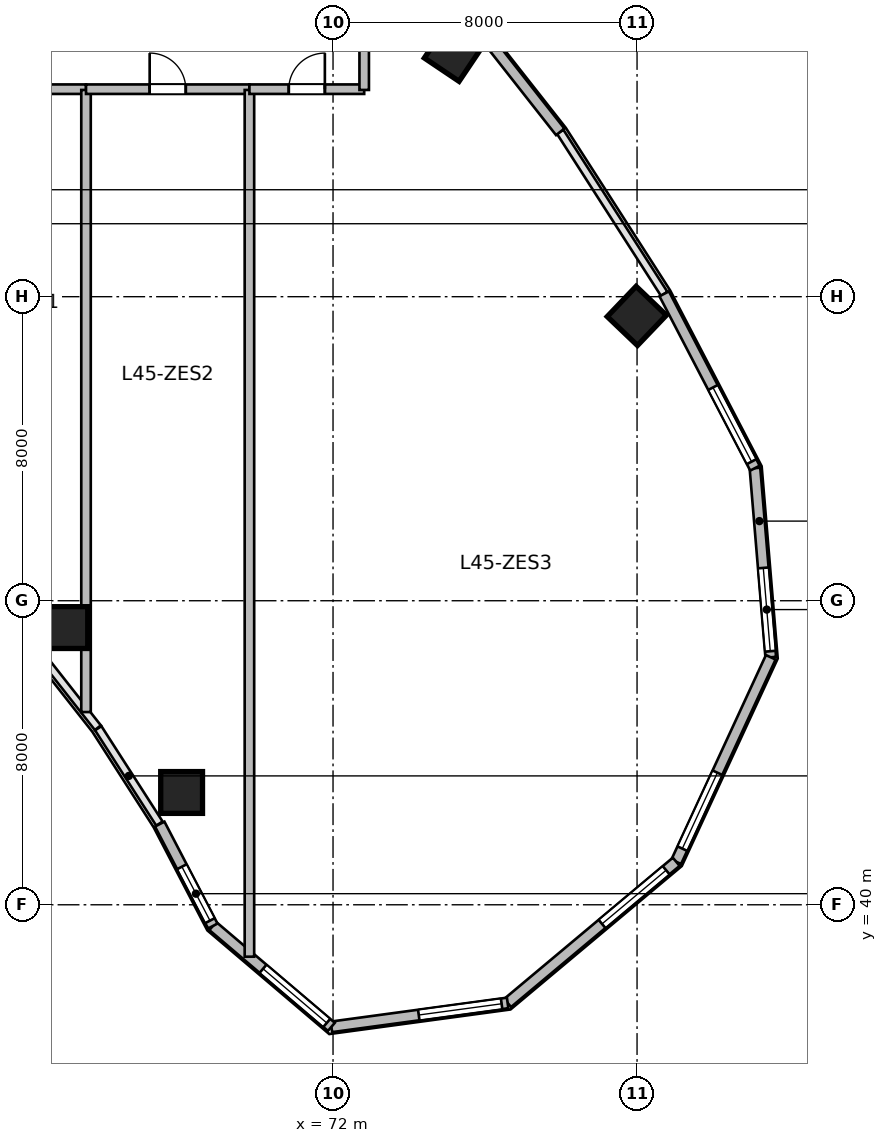
"""IFC4 building model, lengths in metres.
Left out: names, types, materials, properties, quantities, classifications, styles, units other than length and angle.
Written with IfcOpenShell. Run it as: python <this file> out.ifc"""

import sys

from ifc_helpers import new_model, si_unit, direction, frame, frame_2d, origin, origin_2d, place, context, subcontext, project, spatial, rectangle, circle, extrude, source, transform, mapped, element, fill, save


model = new_model("IFC4")
c1 = context("Model", 3, precision=1e-05, world=origin(), true_north=direction((0.0, 1.0)))
c2 = subcontext(c1, "Body", "Model", "MODEL_VIEW")
j1 = project(units=[si_unit("LENGTHUNIT", "METRE"), si_unit("PLANEANGLEUNIT", "RADIAN")], contexts=[c1])
p1 = place(None, origin())
s1 = spatial("IfcSite", under=j1, at=p1, CompositionType="ELEMENT")
p2 = place(p1, origin())
s2 = spatial("IfcBuilding", under=s1, at=p2, CompositionType="ELEMENT")
p3 = place(p2, frame((0.0, 0.0, 185.7)))
s3 = spatial("IfcBuildingStorey", under=s2, at=p3, CompositionType="ELEMENT", Elevation=185.7)
m1 = source(origin(), c2, "Body", "SweptSolid", [
    extrude(circle(Radius=0.55, at=origin_2d()), origin(), (0.0, 0.0, 1.0), 3.9),
])
p4 = place(p3, frame((64.996, 47.294, 0.0), z_axis=(0.0, 0.0, 1.0), x_axis=(0.55774510898, 0.830012285095, 0.0)))
e1 = element("IfcColumn", 1, at=p4, inside=s3, PredefinedType="COLUMN", context=c2, shape_type="MappedRepresentation", body=[
    mapped(m1, transform((0.0, 0.0, 0.0), scale=1.0)),
])
m2 = source(origin(), c2, "Body", "SweptSolid", [
    extrude(rectangle(XDim=1.1, YDim=1.1, at=origin_2d()), origin(), (0.0, 0.0, 1.0), 3.9),
])
p5 = place(p3, frame((75.167, 62.43, 0.0), z_axis=(0.0, 0.0, 1.0), x_axis=(0.55774510898, 0.830012285095, 0.0)))
e2 = element("IfcColumn", 2, at=p5, inside=s3, PredefinedType="COLUMN", context=c2, shape_type="MappedRepresentation", body=[
    mapped(m2, transform((0.0, 0.0, 0.0), scale=1.0)),
])
p6 = place(p3, frame((68.015, 42.955, 0.0), z_axis=(0.0, 0.0, 1.0), x_axis=(0.690756218984, 0.723087716626, 0.0)))
e3 = element("IfcColumn", 3, at=p6, inside=s3, PredefinedType="COLUMN", context=c2, shape_type="MappedRepresentation", body=[
    mapped(m1, transform((0.0, 0.0, 0.0), scale=1.0)),
])
p7 = place(p3, frame((79.993, 55.494, 0.0), z_axis=(0.0, 0.0, 1.0), x_axis=(0.690756218984, 0.723087716626, 0.0)))
e4 = element("IfcColumn", 4, at=p7, inside=s3, PredefinedType="COLUMN", context=c2, shape_type="MappedRepresentation", body=[
    mapped(m2, transform((0.0, 0.0, 0.0), scale=1.0)),
])
m3 = source(origin(), c2, "Body", "SweptSolid", [
    extrude(rectangle(XDim=4.994, YDim=0.28, at=frame_2d((2.497, 0.0))), origin(), (0.0, 0.0, 1.0), 3.58),
])
p8 = place(p3, frame((83.102, 51.489, 0.0), z_axis=(0.0, 0.0, 1.0), x_axis=(0.083344839916, -0.996520766296, 0.0)))
e5 = element("IfcWall", 5, at=p8, inside=s3, PredefinedType="SOLIDWALL", context=c2, shape_type="MappedRepresentation", body=[
    mapped(m3, transform((0.0, 0.0, 0.0), scale=1.0)),
])
p9 = place(p8, frame((2.635, 0.0, 0.95)))
e6 = element("IfcOpeningElement", 6, at=p9, cuts=e5, PredefinedType="OPENING", context=c2, shape_type="SweptSolid", body=[
    extrude(rectangle(XDim=2.2, YDim=2.1, at=frame_2d((1.1, 1.05))), frame((0.0, 0.15, 0.0), z_axis=(0.0, -1.0, 0.0), x_axis=(1.0, 0.0, 0.0)), (0.0, 0.0, 1.0), 0.3),
])
m4 = source(origin(), c2, "Body", "SweptSolid", [
    extrude(rectangle(XDim=5.927, YDim=0.28, at=frame_2d((2.964, 0.0))), origin(), (0.0, 0.0, 1.0), 3.58),
])
p10 = place(p3, frame((83.519, 46.512, 0.0), z_axis=(0.0, 0.0, 1.0), x_axis=(-0.419656204795, -0.907683132914, 0.0)))
e7 = element("IfcWall", 7, at=p10, inside=s3, PredefinedType="SOLIDWALL", context=c2, shape_type="MappedRepresentation", body=[
    mapped(m4, transform((0.0, 0.0, 0.0), scale=1.0)),
])
p11 = place(p10, frame((3.346, 0.0, 0.95)))
e8 = element("IfcOpeningElement", 8, at=p11, cuts=e7, PredefinedType="OPENING", context=c2, shape_type="SweptSolid", body=[
    extrude(rectangle(XDim=2.2, YDim=2.1, at=frame_2d((1.1, 1.05))), frame((0.0, 0.15, 0.0), z_axis=(0.0, -1.0, 0.0), x_axis=(1.0, 0.0, 0.0)), (0.0, 0.0, 1.0), 0.3),
])
m5 = source(origin(), c2, "Body", "SweptSolid", [
    extrude(rectangle(XDim=5.786, YDim=0.28, at=frame_2d((2.893, 0.0))), origin(), (0.0, 0.0, 1.0), 3.58),
])
p12 = place(p3, frame((81.031, 41.131, 0.0), z_axis=(0.0, 0.0, 1.0), x_axis=(-0.766711306852, -0.641992034176, 0.0)))
e9 = element("IfcWall", 9, at=p12, inside=s3, PredefinedType="SOLIDWALL", context=c2, shape_type="MappedRepresentation", body=[
    mapped(m5, transform((0.0, 0.0, 0.0), scale=1.0)),
])
p13 = place(p12, frame((0.347, 0.0, 0.95)))
e10 = element("IfcOpeningElement", 10, at=p13, cuts=e9, PredefinedType="OPENING", context=c2, shape_type="SweptSolid", body=[
    extrude(rectangle(XDim=2.2, YDim=2.1, at=frame_2d((1.1, 1.05))), frame((0.0, 0.15, 0.0), z_axis=(0.0, -1.0, 0.0), x_axis=(1.0, 0.0, 0.0)), (0.0, 0.0, 1.0), 0.3),
])
m6 = source(origin(), c2, "Body", "SweptSolid", [
    extrude(rectangle(XDim=4.68, YDim=0.28, at=frame_2d((2.34, 0.0))), origin(), (0.0, 0.0, 1.0), 3.58),
])
p14 = place(p3, frame((76.594, 37.417, 0.0), z_axis=(0.0, 0.0, 1.0), x_axis=(-0.990931146435, -0.134370618162, 0.0)))
e11 = element("IfcWall", 11, at=p14, inside=s3, PredefinedType="SOLIDWALL", context=c2, shape_type="MappedRepresentation", body=[
    mapped(m6, transform((0.0, 0.0, 0.0), scale=1.0)),
])
p15 = place(p14, frame((0.16, 0.0, 0.95)))
e12 = element("IfcOpeningElement", 12, at=p15, cuts=e11, PredefinedType="OPENING", context=c2, shape_type="SweptSolid", body=[
    extrude(rectangle(XDim=2.2, YDim=2.1, at=frame_2d((1.1, 1.05))), frame((0.0, 0.15, 0.0), z_axis=(0.0, -1.0, 0.0), x_axis=(1.0, 0.0, 0.0)), (0.0, 0.0, 1.0), 0.3),
])
m7 = source(origin(), c2, "Body", "SweptSolid", [
    extrude(rectangle(XDim=4.096, YDim=0.28, at=frame_2d((2.048, 0.0))), origin(), (0.0, 0.0, 1.0), 3.58),
])
p16 = place(p3, frame((71.957, 36.788, 0.0), z_axis=(0.0, 0.0, 1.0), x_axis=(-0.761926081737, 0.647663991564, 0.0)))
e13 = element("IfcWall", 13, at=p16, inside=s3, PredefinedType="SOLIDWALL", context=c2, shape_type="MappedRepresentation", body=[
    mapped(m7, transform((0.0, 0.0, 0.0), scale=1.0)),
])
p17 = place(p16, frame((0.16, 0.0, 0.95)))
e14 = element("IfcOpeningElement", 14, at=p17, cuts=e13, PredefinedType="OPENING", context=c2, shape_type="SweptSolid", body=[
    extrude(rectangle(XDim=2.2, YDim=2.1, at=frame_2d((1.1, 1.05))), frame((0.0, 0.15, 0.0), z_axis=(0.0, -1.0, 0.0), x_axis=(1.0, 0.0, 0.0)), (0.0, 0.0, 1.0), 0.3),
])
m8 = source(origin(), c2, "Body", "SweptSolid", [
    extrude(rectangle(XDim=3.024, YDim=0.28, at=frame_2d((1.512, 0.0))), origin(), (0.0, 0.0, 1.0), 3.58),
])
p18 = place(p3, frame((68.836, 39.44, 0.0), z_axis=(0.0, 0.0, 1.0), x_axis=(-0.461718746531, 0.887026380161, 0.0)))
e15 = element("IfcWall", 15, at=p18, inside=s3, PredefinedType="SOLIDWALL", context=c2, shape_type="MappedRepresentation", body=[
    mapped(m8, transform((0.0, 0.0, 0.0), scale=1.0)),
])
p19 = place(p18, frame((0.16, 0.0, 0.95)))
e16 = element("IfcOpeningElement", 16, at=p19, cuts=e15, PredefinedType="OPENING", context=c2, shape_type="SweptSolid", body=[
    extrude(rectangle(XDim=1.6, YDim=1.9, at=frame_2d((0.8, 0.95))), frame((0.0, 0.15, 0.0), z_axis=(0.0, -1.0, 0.0), x_axis=(1.0, 0.0, 0.0)), (0.0, 0.0, 1.0), 0.3),
])
m9 = source(origin(), c2, "Body", "SweptSolid", [
    extrude(rectangle(XDim=4.922, YDim=0.28, at=frame_2d((2.461, 0.0))), origin(), (0.0, 0.0, 1.0), 3.58),
])
p20 = place(p3, frame((74.936, 64.206, 0.0), z_axis=(0.0, 0.0, 1.0), x_axis=(0.61817639101, -0.786039407153, 0.0)))
e17 = element("IfcWall", 17, at=p20, inside=s3, PredefinedType="SOLIDWALL", context=c2, shape_type="MappedRepresentation", body=[
    mapped(m9, transform((0.0, 0.0, 0.0), scale=1.0)),
])
m10 = source(origin(), c2, "Body", "SweptSolid", [
    extrude(rectangle(XDim=5.171, YDim=0.28, at=frame_2d((2.585, 0.0))), origin(), (0.0, 0.0, 1.0), 3.58),
])
p21 = place(p3, frame((80.715, 56.075, 0.0), z_axis=(0.0, 0.0, 1.0), x_axis=(0.461752581363, -0.887008767491, 0.0)))
e18 = element("IfcWall", 18, at=p21, inside=s3, PredefinedType="SOLIDWALL", context=c2, shape_type="MappedRepresentation", body=[
    mapped(m10, transform((0.0, 0.0, 0.0), scale=1.0)),
])
p22 = place(p21, frame((2.778, 0.0, 0.95)))
e19 = element("IfcOpeningElement", 19, at=p22, cuts=e18, PredefinedType="OPENING", context=c2, shape_type="SweptSolid", body=[
    extrude(rectangle(XDim=2.2, YDim=2.1, at=frame_2d((1.1, 1.05))), frame((0.0, 0.15, 0.0), z_axis=(0.0, -1.0, 0.0), x_axis=(1.0, 0.0, 0.0)), (0.0, 0.0, 1.0), 0.3),
])
m11 = source(origin(), c2, "Body", "SweptSolid", [
    extrude(rectangle(XDim=3.9, YDim=0.25, at=frame_2d((1.95, 0.0))), origin(), (0.0, 0.0, 1.0), 3.58),
])
p23 = place(p3, frame((61.6, 61.46, 0.0), z_axis=(0.0, 0.0, 1.0), x_axis=(1.0, 0.0, 0.0)))
e20 = element("IfcWall", 20, at=p23, inside=s3, PredefinedType="PARTITIONING", context=c2, shape_type="MappedRepresentation", body=[
    mapped(m11, transform((0.0, 0.0, 0.0), scale=1.0)),
])
p24 = place(p23, frame((1.475, 0.0, 0.0)))
e21 = element("IfcOpeningElement", 21, at=p24, cuts=e20, PredefinedType="OPENING", context=c2, shape_type="SweptSolid", body=[
    extrude(rectangle(XDim=0.95, YDim=2.1, at=frame_2d((0.475, 1.05))), frame((0.0, 0.135, 0.0), z_axis=(0.0, -1.0, 0.0), x_axis=(1.0, 0.0, 0.0)), (0.0, 0.0, 1.0), 0.27),
])
m12 = source(origin(), c2, "Body", "SweptSolid", [
    extrude(rectangle(XDim=16.369, YDim=0.25, at=frame_2d((8.185, 0.0))), origin(), (0.0, 0.0, 1.0), 2.872),
])
p25 = place(p3, frame((65.5, 45.071, 0.0), z_axis=(0.0, 0.0, 1.0), x_axis=(0.0, 1.0, 0.0)))
e22 = element("IfcWall", 22, at=p25, inside=s3, PredefinedType="PARTITIONING", context=c2, shape_type="MappedRepresentation", body=[
    mapped(m12, transform((0.0, 0.0, 0.0), scale=1.0)),
])
m13 = source(origin(), c2, "Body", "SweptSolid", [
    extrude(rectangle(XDim=4.3, YDim=0.25, at=frame_2d((2.15, 0.0))), origin(), (0.0, 0.0, 1.0), 3.58),
])
p26 = place(p3, frame((65.5, 61.46, 0.0), z_axis=(0.0, 0.0, 1.0), x_axis=(1.0, 0.0, 0.0)))
e23 = element("IfcWall", 23, at=p26, inside=s3, PredefinedType="PARTITIONING", context=c2, shape_type="MappedRepresentation", body=[
    mapped(m13, transform((0.0, 0.0, 0.0), scale=1.0)),
])
p27 = place(p26, frame((1.675, 0.0, 0.0)))
e24 = element("IfcOpeningElement", 24, at=p27, cuts=e23, PredefinedType="OPENING", context=c2, shape_type="SweptSolid", body=[
    extrude(rectangle(XDim=0.95, YDim=2.1, at=frame_2d((0.475, 1.05))), frame((0.0, 0.135, 0.0), z_axis=(0.0, -1.0, 0.0), x_axis=(1.0, 0.0, 0.0)), (0.0, 0.0, 1.0), 0.27),
])
m14 = source(origin(), c2, "Body", "SweptSolid", [
    extrude(rectangle(XDim=22.806, YDim=0.25, at=frame_2d((11.403, 0.0))), origin(), (0.0, 0.0, 1.0), 2.872),
])
p28 = place(p3, frame((69.8, 38.634, 0.0), z_axis=(0.0, 0.0, 1.0), x_axis=(0.0, 1.0, 0.0)))
e25 = element("IfcWall", 25, at=p28, inside=s3, PredefinedType="PARTITIONING", context=c2, shape_type="MappedRepresentation", body=[
    mapped(m14, transform((0.0, 0.0, 0.0), scale=1.0)),
])
m15 = source(origin(), c2, "Body", "SweptSolid", [
    extrude(rectangle(XDim=3.02, YDim=0.25, at=frame_2d((1.51, 0.0))), origin(), (0.0, 0.0, 1.0), 3.58),
])
p29 = place(p3, frame((69.8, 61.46, 0.0), z_axis=(0.0, 0.0, 1.0), x_axis=(1.0, 0.0, 0.0)))
e26 = element("IfcWall", 26, at=p29, inside=s3, PredefinedType="PARTITIONING", context=c2, shape_type="MappedRepresentation", body=[
    mapped(m15, transform((0.0, 0.0, 0.0), scale=1.0)),
])
p30 = place(p29, frame((1.035, 0.0, 0.0)))
e27 = element("IfcOpeningElement", 27, at=p30, cuts=e26, PredefinedType="OPENING", context=c2, shape_type="SweptSolid", body=[
    extrude(rectangle(XDim=0.95, YDim=2.1, at=frame_2d((0.475, 1.05))), frame((0.0, 0.135, 0.0), z_axis=(0.0, -1.0, 0.0), x_axis=(1.0, 0.0, 0.0)), (0.0, 0.0, 1.0), 0.27),
])
m16 = source(origin(), c2, "Body", "SweptSolid", [
    extrude(rectangle(XDim=2.62, YDim=0.25, at=frame_2d((1.31, 0.0))), origin(), (0.0, 0.0, 1.0), 3.023),
])
p31 = place(p3, frame((72.82, 61.44, 0.0), z_axis=(0.0, 0.0, 1.0), x_axis=(0.0, 1.0, 0.0)))
e28 = element("IfcWall", 28, at=p31, inside=s3, PredefinedType="PARTITIONING", context=c2, shape_type="MappedRepresentation", body=[
    mapped(m16, transform((0.0, 0.0, 0.0), scale=1.0)),
])
m17 = source(origin(), c2, "Body", "SweptSolid", [
    extrude(rectangle(XDim=2.2, YDim=2.1, at=frame_2d((1.1, 1.05))), frame((0.0, 0.03, 0.0), z_axis=(0.0, -1.0, 0.0), x_axis=(1.0, 0.0, 0.0)), (0.0, 0.0, 1.0), 0.06),
])
p32 = place(p9, origin())
e29 = element("IfcWindow", 29, at=p32, inside=s3, PartitioningType="TRIPLE_PANEL_VERTICAL", PredefinedType="WINDOW", context=c2, shape_type="MappedRepresentation", body=[
    mapped(m17, transform((0.0, 0.0, 0.0), scale=1.0)),
])
fill(e6, e29)
p33 = place(p11, origin())
e30 = element("IfcWindow", 30, at=p33, inside=s3, PartitioningType="TRIPLE_PANEL_VERTICAL", PredefinedType="WINDOW", context=c2, shape_type="MappedRepresentation", body=[
    mapped(m17, transform((0.0, 0.0, 0.0), scale=1.0)),
])
fill(e8, e30)
p34 = place(p13, origin())
e31 = element("IfcWindow", 31, at=p34, inside=s3, PartitioningType="TRIPLE_PANEL_VERTICAL", PredefinedType="WINDOW", context=c2, shape_type="MappedRepresentation", body=[
    mapped(m17, transform((0.0, 0.0, 0.0), scale=1.0)),
])
fill(e10, e31)
p35 = place(p15, origin())
e32 = element("IfcWindow", 32, at=p35, inside=s3, PartitioningType="TRIPLE_PANEL_VERTICAL", PredefinedType="WINDOW", context=c2, shape_type="MappedRepresentation", body=[
    mapped(m17, transform((0.0, 0.0, 0.0), scale=1.0)),
])
fill(e12, e32)
p36 = place(p17, origin())
e33 = element("IfcWindow", 33, at=p36, inside=s3, PartitioningType="TRIPLE_PANEL_VERTICAL", PredefinedType="WINDOW", context=c2, shape_type="MappedRepresentation", body=[
    mapped(m17, transform((0.0, 0.0, 0.0), scale=1.0)),
])
fill(e14, e33)
m18 = source(origin(), c2, "Body", "SweptSolid", [
    extrude(rectangle(XDim=1.6, YDim=1.9, at=frame_2d((0.8, 0.95))), frame((0.0, 0.03, 0.0), z_axis=(0.0, -1.0, 0.0), x_axis=(1.0, 0.0, 0.0)), (0.0, 0.0, 1.0), 0.06),
])
p37 = place(p19, origin())
e34 = element("IfcWindow", 34, at=p37, inside=s3, PartitioningType="SINGLE_PANEL", PredefinedType="WINDOW", context=c2, shape_type="MappedRepresentation", body=[
    mapped(m18, transform((0.0, 0.0, 0.0), scale=1.0)),
])
fill(e16, e34)
p38 = place(p22, origin())
e35 = element("IfcWindow", 35, at=p38, inside=s3, PartitioningType="TRIPLE_PANEL_VERTICAL", PredefinedType="WINDOW", context=c2, shape_type="MappedRepresentation", body=[
    mapped(m17, transform((0.0, 0.0, 0.0), scale=1.0)),
])
fill(e19, e35)
m19 = source(origin(), c2, "Body", "SweptSolid", [
    extrude(rectangle(XDim=0.95, YDim=2.1, at=frame_2d((0.475, 1.05))), frame((0.0, 0.025, 0.0), z_axis=(0.0, -1.0, 0.0), x_axis=(1.0, 0.0, 0.0)), (0.0, 0.0, 1.0), 0.05),
])
p39 = place(p27, origin())
e36 = element("IfcDoor", 36, at=p39, inside=s3, OperationType="SINGLE_SWING_LEFT", PredefinedType="DOOR", context=c2, shape_type="MappedRepresentation", body=[
    mapped(m19, transform((0.0, 0.0, 0.0), scale=1.0)),
])
fill(e24, e36)
p40 = place(p30, origin())
e37 = element("IfcDoor", 37, at=p40, inside=s3, OperationType="SINGLE_SWING_RIGHT", PredefinedType="DOOR", context=c2, shape_type="MappedRepresentation", body=[
    mapped(m19, transform((0.0, 0.0, 0.0), scale=1.0)),
])
fill(e27, e37)
save(model, sys.argv[1])
